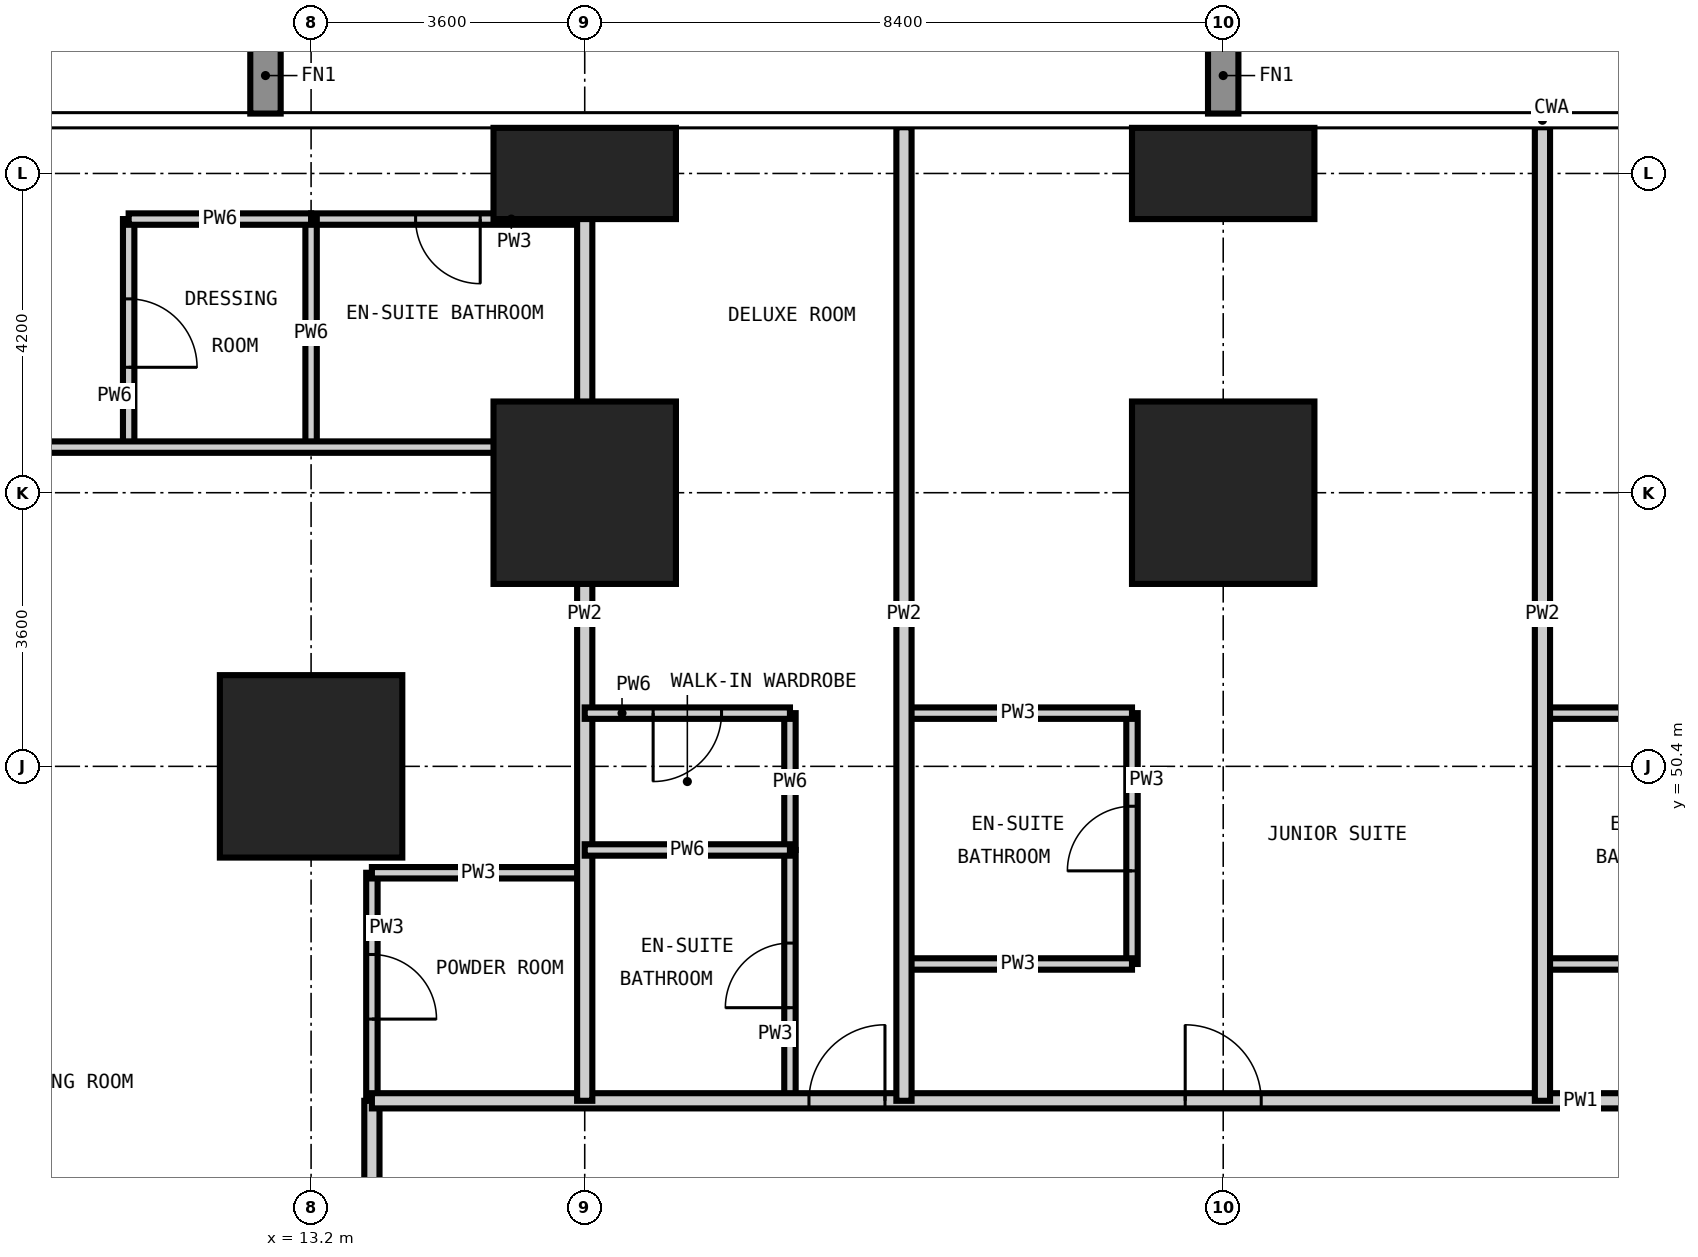
"""IFC4 building model, lengths in metres.
Left out: names, types, materials, properties, quantities, classifications, styles, units other than length and angle.
Written with IfcOpenShell. Run it as: python <this file> out.ifc"""

import sys

from ifc_helpers import new_model, si_unit, direction, frame, frame_2d, origin, origin_2d, place, context, subcontext, project, spatial, rectangle, extrude, element, fill, save


model = new_model("IFC4")
c1 = context("Model", 3, precision=1e-05, world=origin(), true_north=direction((0.0, 1.0)))
c2 = subcontext(c1, "Body", "Model", "MODEL_VIEW")
j1 = project(units=[si_unit("LENGTHUNIT", "METRE"), si_unit("PLANEANGLEUNIT", "RADIAN")], contexts=[c1])
p1 = place(None, origin())
s1 = spatial("IfcSite", under=j1, at=p1, CompositionType="ELEMENT")
p2 = place(p1, origin())
s2 = spatial("IfcBuilding", under=s1, at=p2, CompositionType="ELEMENT")
p3 = place(p2, frame((0.0, 0.0, 81.0)))
s3 = spatial("IfcBuildingStorey", under=s2, at=p3, CompositionType="ELEMENT", Elevation=81.0)
for number, where, z_axis, x_axis in (
    (1, (13.2, 50.4, -0.35), (0.0, 0.0, 1.0), (1.0, 0.0, 0.0)),
    (2, (16.8, 54.0, -0.35), (0.0, 0.0, 1.0), (1.0, 0.0, 0.0)),
):
    element("IfcColumn", number, at=place(p3, frame(where, z_axis=z_axis, x_axis=x_axis)), inside=s3, PredefinedType="COLUMN", context=c2, shape_type="SweptSolid", body=[
        extrude(rectangle(XDim=2.4, YDim=2.4, at=origin_2d()), origin(), (0.0, 0.0, 1.0), 3.6),
    ])
p4 = place(p3, frame((16.8, 58.2, -0.35), z_axis=(0.0, 0.0, 1.0), x_axis=(1.0, 0.0, 0.0)))
e3 = element("IfcColumn", 3, at=p4, inside=s3, PredefinedType="COLUMN", context=c2, shape_type="SweptSolid", body=[
    extrude(rectangle(XDim=2.4, YDim=1.2, at=origin_2d()), origin(), (0.0, 0.0, 1.0), 3.6),
])
p5 = place(p3, frame((25.2, 54.0, -0.35), z_axis=(0.0, 0.0, 1.0), x_axis=(1.0, 0.0, 0.0)))
e4 = element("IfcColumn", 4, at=p5, inside=s3, PredefinedType="COLUMN", context=c2, shape_type="SweptSolid", body=[
    extrude(rectangle(XDim=2.4, YDim=2.4, at=origin_2d()), origin(), (0.0, 0.0, 1.0), 3.6),
])
p6 = place(p3, frame((25.2, 58.2, -0.35), z_axis=(0.0, 0.0, 1.0), x_axis=(1.0, 0.0, 0.0)))
e5 = element("IfcColumn", 5, at=p6, inside=s3, PredefinedType="COLUMN", context=c2, shape_type="SweptSolid", body=[
    extrude(rectangle(XDim=2.4, YDim=1.2, at=origin_2d()), origin(), (0.0, 0.0, 1.0), 3.6),
])
p7 = place(p3, frame((14.0, 46.0, 0.0), z_axis=(0.0, 0.0, 1.0), x_axis=(0.0, 1.0, 0.0)))
e6 = element("IfcWall", 6, at=p7, inside=s3, PredefinedType="PARTITIONING", context=c2, shape_type="SweptSolid", body=[
    extrude(rectangle(XDim=3.0, YDim=0.15, at=frame_2d((1.5, 0.0))), origin(), (0.0, 0.0, 1.0), 3.25),
])
p8 = place(p7, frame((1.075, 0.0, 0.0)))
e7 = element("IfcOpeningElement", 7, at=p8, cuts=e6, PredefinedType="OPENING", context=c2, shape_type="SweptSolid", body=[
    extrude(rectangle(XDim=0.85, YDim=2.1, at=frame_2d((0.425, 1.05))), frame((0.0, 0.085, 0.0), z_axis=(0.0, -1.0, 0.0), x_axis=(1.0, 0.0, 0.0)), (0.0, 0.0, 1.0), 0.17),
])
p9 = place(p3, frame((19.5, 46.0, 0.0), z_axis=(0.0, 0.0, 1.0), x_axis=(0.0, 1.0, 0.0)))
e8 = element("IfcWall", 8, at=p9, inside=s3, PredefinedType="PARTITIONING", context=c2, shape_type="SweptSolid", body=[
    extrude(rectangle(XDim=3.3, YDim=0.15, at=frame_2d((1.65, 0.0))), origin(), (0.0, 0.0, 1.0), 3.25),
])
p10 = place(p9, frame((1.225, 0.0, 0.0)))
e9 = element("IfcOpeningElement", 9, at=p10, cuts=e8, PredefinedType="OPENING", context=c2, shape_type="SweptSolid", body=[
    extrude(rectangle(XDim=0.85, YDim=2.1, at=frame_2d((0.425, 1.05))), frame((0.0, 0.085, 0.0), z_axis=(0.0, -1.0, 0.0), x_axis=(1.0, 0.0, 0.0)), (0.0, 0.0, 1.0), 0.17),
])
p11 = place(p3, frame((24.0, 47.8, 0.0), z_axis=(0.0, 0.0, 1.0), x_axis=(0.0, 1.0, 0.0)))
e10 = element("IfcWall", 10, at=p11, inside=s3, PredefinedType="PARTITIONING", context=c2, shape_type="SweptSolid", body=[
    extrude(rectangle(XDim=3.3, YDim=0.15, at=frame_2d((1.65, 0.0))), origin(), (0.0, 0.0, 1.0), 3.25),
])
p12 = place(p11, frame((1.225, 0.0, 0.0)))
e11 = element("IfcOpeningElement", 11, at=p12, cuts=e10, PredefinedType="OPENING", context=c2, shape_type="SweptSolid", body=[
    extrude(rectangle(XDim=0.85, YDim=2.1, at=frame_2d((0.425, 1.05))), frame((0.0, 0.085, 0.0), z_axis=(0.0, -1.0, 0.0), x_axis=(1.0, 0.0, 0.0)), (0.0, 0.0, 1.0), 0.17),
])
for number, where, z_axis, x_axis in (
    (12, (21.0, 47.8, 0.0), (0.0, 0.0, 1.0), (1.0, 0.0, 0.0)),
    (13, (29.4, 47.8, 0.0), (0.0, 0.0, 1.0), (1.0, 0.0, 0.0)),
):
    element("IfcWall", number, at=place(p3, frame(where, z_axis=z_axis, x_axis=x_axis)), inside=s3, PredefinedType="PARTITIONING", context=c2, shape_type="SweptSolid", body=[
        extrude(rectangle(XDim=3.0, YDim=0.15, at=frame_2d((1.5, 0.0))), origin(), (0.0, 0.0, 1.0), 3.25),
    ])
p13 = place(p3, frame((14.0, 49.0, 0.0), z_axis=(0.0, 0.0, 1.0), x_axis=(1.0, 0.0, 0.0)))
e14 = element("IfcWall", 14, at=p13, inside=s3, PredefinedType="PARTITIONING", context=c2, shape_type="SweptSolid", body=[
    extrude(rectangle(XDim=2.8, YDim=0.15, at=frame_2d((1.4, 0.0))), origin(), (0.0, 0.0, 1.0), 3.25),
])
for number, where, z_axis, x_axis in (
    (15, (21.0, 51.1, 0.0), (0.0, 0.0, 1.0), (1.0, 0.0, 0.0)),
    (16, (29.4, 51.1, 0.0), (0.0, 0.0, 1.0), (1.0, 0.0, 0.0)),
):
    element("IfcWall", number, at=place(p3, frame(where, z_axis=z_axis, x_axis=x_axis)), inside=s3, PredefinedType="PARTITIONING", context=c2, shape_type="SweptSolid", body=[
        extrude(rectangle(XDim=3.0, YDim=0.15, at=frame_2d((1.5, 0.0))), origin(), (0.0, 0.0, 1.0), 3.25),
    ])
p14 = place(p3, frame((13.2, 57.6, 0.0), z_axis=(0.0, 0.0, 1.0), x_axis=(1.0, 0.0, 0.0)))
e17 = element("IfcWall", 17, at=p14, inside=s3, PredefinedType="PARTITIONING", context=c2, shape_type="SweptSolid", body=[
    extrude(rectangle(XDim=3.6, YDim=0.15, at=frame_2d((1.8, 0.0))), origin(), (0.0, 0.0, 1.0), 3.25),
])
p15 = place(p14, frame((1.375, 0.0, 0.0)))
e18 = element("IfcOpeningElement", 18, at=p15, cuts=e17, PredefinedType="OPENING", context=c2, shape_type="SweptSolid", body=[
    extrude(rectangle(XDim=0.85, YDim=2.1, at=frame_2d((0.425, 1.05))), frame((0.0, 0.085, 0.0), z_axis=(0.0, -1.0, 0.0), x_axis=(1.0, 0.0, 0.0)), (0.0, 0.0, 1.0), 0.17),
])
p16 = place(p3, frame((14.0, 14.0, 0.0), z_axis=(0.0, 0.0, 1.0), x_axis=(0.0, 1.0, 0.0)))
e19 = element("IfcWall", 19, at=p16, inside=s3, PredefinedType="PARTITIONING", context=c2, shape_type="SweptSolid", body=[
    extrude(rectangle(XDim=32.0, YDim=0.2, at=frame_2d((16.0, 0.0))), origin(), (0.0, 0.0, 1.0), 3.25),
])
p17 = place(p16, frame((5.75, 0.0, 0.0)))
e20 = element("IfcOpeningElement", 20, at=p17, cuts=e19, PredefinedType="OPENING", context=c2, shape_type="SweptSolid", body=[
    extrude(rectangle(XDim=1.0, YDim=2.2, at=frame_2d((0.5, 1.1))), frame((0.0, 0.11, 0.0), z_axis=(0.0, -1.0, 0.0), x_axis=(1.0, 0.0, 0.0)), (0.0, 0.0, 1.0), 0.22),
])
p18 = place(p16, frame((12.5, 0.0, 0.0)))
e21 = element("IfcOpeningElement", 21, at=p18, cuts=e19, PredefinedType="OPENING", context=c2, shape_type="SweptSolid", body=[
    extrude(rectangle(XDim=1.0, YDim=2.2, at=frame_2d((0.5, 1.1))), frame((0.0, 0.11, 0.0), z_axis=(0.0, -1.0, 0.0), x_axis=(1.0, 0.0, 0.0)), (0.0, 0.0, 1.0), 0.22),
])
p19 = place(p16, frame((17.3, 0.0, 0.0)))
e22 = element("IfcOpeningElement", 22, at=p19, cuts=e19, PredefinedType="OPENING", context=c2, shape_type="SweptSolid", body=[
    extrude(rectangle(XDim=1.0, YDim=2.2, at=frame_2d((0.5, 1.1))), frame((0.0, 0.11, 0.0), z_axis=(0.0, -1.0, 0.0), x_axis=(1.0, 0.0, 0.0)), (0.0, 0.0, 1.0), 0.22),
])
p20 = place(p16, frame((24.05, 0.0, 0.0)))
e23 = element("IfcOpeningElement", 23, at=p20, cuts=e19, PredefinedType="OPENING", context=c2, shape_type="SweptSolid", body=[
    extrude(rectangle(XDim=1.0, YDim=2.2, at=frame_2d((0.5, 1.1))), frame((0.0, 0.11, 0.0), z_axis=(0.0, -1.0, 0.0), x_axis=(1.0, 0.0, 0.0)), (0.0, 0.0, 1.0), 0.22),
])
p21 = place(p16, frame((0.5, 0.0, 0.0)))
e24 = element("IfcOpeningElement", 24, at=p21, cuts=e19, PredefinedType="OPENING", context=c2, shape_type="SweptSolid", body=[
    extrude(rectangle(XDim=1.0, YDim=2.2, at=frame_2d((0.5, 1.1))), frame((0.0, 0.11, 0.0), z_axis=(0.0, -1.0, 0.0), x_axis=(1.0, 0.0, 0.0)), (0.0, 0.0, 1.0), 0.22),
])
p22 = place(p16, frame((29.5, 0.0, 0.0)))
e25 = element("IfcOpeningElement", 25, at=p22, cuts=e19, PredefinedType="OPENING", context=c2, shape_type="SweptSolid", body=[
    extrude(rectangle(XDim=1.0, YDim=2.2, at=frame_2d((0.5, 1.1))), frame((0.0, 0.11, 0.0), z_axis=(0.0, -1.0, 0.0), x_axis=(1.0, 0.0, 0.0)), (0.0, 0.0, 1.0), 0.22),
])
p23 = place(p3, frame((14.0, 46.0, 0.0), z_axis=(0.0, 0.0, 1.0), x_axis=(1.0, 0.0, 0.0)))
e26 = element("IfcWall", 26, at=p23, inside=s3, PredefinedType="PARTITIONING", context=c2, shape_type="SweptSolid", body=[
    extrude(rectangle(XDim=31.4, YDim=0.2, at=frame_2d((15.7, 0.0))), origin(), (0.0, 0.0, 1.0), 3.25),
])
p24 = place(p23, frame((5.75, 0.0, 0.0)))
e27 = element("IfcOpeningElement", 27, at=p24, cuts=e26, PredefinedType="OPENING", context=c2, shape_type="SweptSolid", body=[
    extrude(rectangle(XDim=1.0, YDim=2.2, at=frame_2d((0.5, 1.1))), frame((0.0, 0.11, 0.0), z_axis=(0.0, -1.0, 0.0), x_axis=(1.0, 0.0, 0.0)), (0.0, 0.0, 1.0), 0.22),
])
p25 = place(p23, frame((10.7, 0.0, 0.0)))
e28 = element("IfcOpeningElement", 28, at=p25, cuts=e26, PredefinedType="OPENING", context=c2, shape_type="SweptSolid", body=[
    extrude(rectangle(XDim=1.0, YDim=2.2, at=frame_2d((0.5, 1.1))), frame((0.0, 0.11, 0.0), z_axis=(0.0, -1.0, 0.0), x_axis=(1.0, 0.0, 0.0)), (0.0, 0.0, 1.0), 0.22),
])
p26 = place(p23, frame((19.1, 0.0, 0.0)))
e29 = element("IfcOpeningElement", 29, at=p26, cuts=e26, PredefinedType="OPENING", context=c2, shape_type="SweptSolid", body=[
    extrude(rectangle(XDim=1.0, YDim=2.2, at=frame_2d((0.5, 1.1))), frame((0.0, 0.11, 0.0), z_axis=(0.0, -1.0, 0.0), x_axis=(1.0, 0.0, 0.0)), (0.0, 0.0, 1.0), 0.22),
])
p27 = place(p23, frame((24.05, 0.0, 0.0)))
e30 = element("IfcOpeningElement", 30, at=p27, cuts=e26, PredefinedType="OPENING", context=c2, shape_type="SweptSolid", body=[
    extrude(rectangle(XDim=1.0, YDim=2.2, at=frame_2d((0.5, 1.1))), frame((0.0, 0.11, 0.0), z_axis=(0.0, -1.0, 0.0), x_axis=(1.0, 0.0, 0.0)), (0.0, 0.0, 1.0), 0.22),
])
for number, where, z_axis, x_axis in (
    (31, (16.8, 46.0, 0.0), (0.0, 0.0, 1.0), (0.0, 1.0, 0.0)),
    (32, (21.0, 46.0, 0.0), (0.0, 0.0, 1.0), (0.0, 1.0, 0.0)),
    (33, (29.4, 46.0, 0.0), (0.0, 0.0, 1.0), (0.0, 1.0, 0.0)),
):
    element("IfcWall", number, at=place(p3, frame(where, z_axis=z_axis, x_axis=x_axis)), inside=s3, PredefinedType="PARTITIONING", context=c2, shape_type="SweptSolid", body=[
        extrude(rectangle(XDim=12.808, YDim=0.2, at=frame_2d((6.404, 0.0))), origin(), (0.0, 0.0, 1.0), 3.25),
    ])
p28 = place(p3, frame((10.8, 54.6, 0.0), z_axis=(0.0, 0.0, 1.0), x_axis=(0.0, 1.0, 0.0)))
e34 = element("IfcWall", 34, at=p28, inside=s3, PredefinedType="PARTITIONING", context=c2, shape_type="SweptSolid", body=[
    extrude(rectangle(XDim=3.0, YDim=0.15, at=frame_2d((1.5, 0.0))), origin(), (0.0, 0.0, 1.0), 3.25),
])
p29 = place(p28, frame((1.05, 0.0, 0.0)))
e35 = element("IfcOpeningElement", 35, at=p29, cuts=e34, PredefinedType="OPENING", context=c2, shape_type="SweptSolid", body=[
    extrude(rectangle(XDim=0.9, YDim=2.1, at=frame_2d((0.45, 1.05))), frame((0.0, 0.085, 0.0), z_axis=(0.0, -1.0, 0.0), x_axis=(1.0, 0.0, 0.0)), (0.0, 0.0, 1.0), 0.17),
])
p30 = place(p3, frame((13.2, 54.6, 0.0), z_axis=(0.0, 0.0, 1.0), x_axis=(0.0, 1.0, 0.0)))
e36 = element("IfcWall", 36, at=p30, inside=s3, PredefinedType="PARTITIONING", context=c2, shape_type="SweptSolid", body=[
    extrude(rectangle(XDim=3.0, YDim=0.15, at=frame_2d((1.5, 0.0))), origin(), (0.0, 0.0, 1.0), 3.25),
])
p31 = place(p3, frame((19.5, 49.3, 0.0), z_axis=(0.0, 0.0, 1.0), x_axis=(0.0, 1.0, 0.0)))
e37 = element("IfcWall", 37, at=p31, inside=s3, PredefinedType="PARTITIONING", context=c2, shape_type="SweptSolid", body=[
    extrude(rectangle(XDim=1.8, YDim=0.15, at=frame_2d((0.9, 0.0))), origin(), (0.0, 0.0, 1.0), 3.25),
])
p32 = place(p3, frame((16.8, 49.3, 0.0), z_axis=(0.0, 0.0, 1.0), x_axis=(1.0, 0.0, 0.0)))
e38 = element("IfcWall", 38, at=p32, inside=s3, PredefinedType="PARTITIONING", context=c2, shape_type="SweptSolid", body=[
    extrude(rectangle(XDim=2.7, YDim=0.15, at=frame_2d((1.35, 0.0))), origin(), (0.0, 0.0, 1.0), 3.25),
])
p33 = place(p3, frame((16.8, 51.1, 0.0), z_axis=(0.0, 0.0, 1.0), x_axis=(1.0, 0.0, 0.0)))
e39 = element("IfcWall", 39, at=p33, inside=s3, PredefinedType="PARTITIONING", context=c2, shape_type="SweptSolid", body=[
    extrude(rectangle(XDim=2.7, YDim=0.15, at=frame_2d((1.35, 0.0))), origin(), (0.0, 0.0, 1.0), 3.25),
])
p34 = place(p33, frame((0.9, 0.0, 0.0)))
e40 = element("IfcOpeningElement", 40, at=p34, cuts=e39, PredefinedType="OPENING", context=c2, shape_type="SweptSolid", body=[
    extrude(rectangle(XDim=0.9, YDim=2.1, at=frame_2d((0.45, 1.05))), frame((0.0, 0.085, 0.0), z_axis=(0.0, -1.0, 0.0), x_axis=(1.0, 0.0, 0.0)), (0.0, 0.0, 1.0), 0.17),
])
p35 = place(p3, frame((-0.008, 54.6, 0.0), z_axis=(0.0, 0.0, 1.0), x_axis=(1.0, 0.0, 0.0)))
e41 = element("IfcWall", 41, at=p35, inside=s3, PredefinedType="PARTITIONING", context=c2, shape_type="SweptSolid", body=[
    extrude(rectangle(XDim=16.808, YDim=0.15, at=frame_2d((8.404, 0.0))), origin(), (0.0, 0.0, 1.0), 3.25),
])
p36 = place(p35, frame((4.958, 0.0, 0.0)))
e42 = element("IfcOpeningElement", 42, at=p36, cuts=e41, PredefinedType="OPENING", context=c2, shape_type="SweptSolid", body=[
    extrude(rectangle(XDim=0.9, YDim=2.1, at=frame_2d((0.45, 1.05))), frame((0.0, 0.085, 0.0), z_axis=(0.0, -1.0, 0.0), x_axis=(1.0, 0.0, 0.0)), (0.0, 0.0, 1.0), 0.17),
])
p37 = place(p3, frame((10.8, 57.6, 0.0), z_axis=(0.0, 0.0, 1.0), x_axis=(1.0, 0.0, 0.0)))
e43 = element("IfcWall", 43, at=p37, inside=s3, PredefinedType="PARTITIONING", context=c2, shape_type="SweptSolid", body=[
    extrude(rectangle(XDim=2.4, YDim=0.15, at=frame_2d((1.2, 0.0))), origin(), (0.0, 0.0, 1.0), 3.25),
])
p38 = place(p24, origin())
e44 = element("IfcDoor", 44, at=p38, inside=s3, OperationType="SINGLE_SWING_RIGHT", PredefinedType="DOOR", context=c2, shape_type="SweptSolid", body=[
    extrude(rectangle(XDim=1.0, YDim=2.2, at=frame_2d((0.5, 1.1))), frame((0.0, 0.025, 0.0), z_axis=(0.0, -1.0, 0.0), x_axis=(1.0, 0.0, 0.0)), (0.0, 0.0, 1.0), 0.05),
])
fill(e27, e44)
p39 = place(p10, origin())
e45 = element("IfcDoor", 45, at=p39, inside=s3, OperationType="SINGLE_SWING_LEFT", PredefinedType="DOOR", context=c2, shape_type="SweptSolid", body=[
    extrude(rectangle(XDim=0.85, YDim=2.1, at=frame_2d((0.425, 1.05))), frame((0.0, 0.025, 0.0), z_axis=(0.0, -1.0, 0.0), x_axis=(1.0, 0.0, 0.0)), (0.0, 0.0, 1.0), 0.05),
])
fill(e9, e45)
p40 = place(p34, frame((0.9, 0.0, 0.0), z_axis=(0.0, 0.0, 1.0), x_axis=(-1.0, 0.0, 0.0)))
e46 = element("IfcDoor", 46, at=p40, inside=s3, OperationType="SINGLE_SWING_RIGHT", PredefinedType="DOOR", context=c2, shape_type="SweptSolid", body=[
    extrude(rectangle(XDim=0.9, YDim=2.1, at=frame_2d((0.45, 1.05))), frame((0.0, 0.025, 0.0), z_axis=(0.0, -1.0, 0.0), x_axis=(1.0, 0.0, 0.0)), (0.0, 0.0, 1.0), 0.05),
])
fill(e40, e46)
p41 = place(p25, origin())
e47 = element("IfcDoor", 47, at=p41, inside=s3, OperationType="SINGLE_SWING_LEFT", PredefinedType="DOOR", context=c2, shape_type="SweptSolid", body=[
    extrude(rectangle(XDim=1.0, YDim=2.2, at=frame_2d((0.5, 1.1))), frame((0.0, 0.025, 0.0), z_axis=(0.0, -1.0, 0.0), x_axis=(1.0, 0.0, 0.0)), (0.0, 0.0, 1.0), 0.05),
])
fill(e28, e47)
p42 = place(p12, origin())
e48 = element("IfcDoor", 48, at=p42, inside=s3, OperationType="SINGLE_SWING_LEFT", PredefinedType="DOOR", context=c2, shape_type="SweptSolid", body=[
    extrude(rectangle(XDim=0.85, YDim=2.1, at=frame_2d((0.425, 1.05))), frame((0.0, 0.025, 0.0), z_axis=(0.0, -1.0, 0.0), x_axis=(1.0, 0.0, 0.0)), (0.0, 0.0, 1.0), 0.05),
])
fill(e11, e48)
p43 = place(p8, frame((0.85, 0.0, 0.0), z_axis=(0.0, 0.0, 1.0), x_axis=(-1.0, 0.0, 0.0)))
e49 = element("IfcDoor", 49, at=p43, inside=s3, OperationType="SINGLE_SWING_RIGHT", PredefinedType="DOOR", context=c2, shape_type="SweptSolid", body=[
    extrude(rectangle(XDim=0.85, YDim=2.1, at=frame_2d((0.425, 1.05))), frame((0.0, 0.025, 0.0), z_axis=(0.0, -1.0, 0.0), x_axis=(1.0, 0.0, 0.0)), (0.0, 0.0, 1.0), 0.05),
])
fill(e7, e49)
p44 = place(p15, frame((0.85, 0.0, 0.0), z_axis=(0.0, 0.0, 1.0), x_axis=(-1.0, 0.0, 0.0)))
e50 = element("IfcDoor", 50, at=p44, inside=s3, OperationType="SINGLE_SWING_LEFT", PredefinedType="DOOR", context=c2, shape_type="SweptSolid", body=[
    extrude(rectangle(XDim=0.85, YDim=2.1, at=frame_2d((0.425, 1.05))), frame((0.0, 0.025, 0.0), z_axis=(0.0, -1.0, 0.0), x_axis=(1.0, 0.0, 0.0)), (0.0, 0.0, 1.0), 0.05),
])
fill(e18, e50)
p45 = place(p29, frame((0.9, 0.0, 0.0), z_axis=(0.0, 0.0, 1.0), x_axis=(-1.0, 0.0, 0.0)))
e51 = element("IfcDoor", 51, at=p45, inside=s3, OperationType="SINGLE_SWING_RIGHT", PredefinedType="DOOR", context=c2, shape_type="SweptSolid", body=[
    extrude(rectangle(XDim=0.9, YDim=2.1, at=frame_2d((0.45, 1.05))), frame((0.0, 0.025, 0.0), z_axis=(0.0, -1.0, 0.0), x_axis=(1.0, 0.0, 0.0)), (0.0, 0.0, 1.0), 0.05),
])
fill(e35, e51)
save(model, sys.argv[1])
